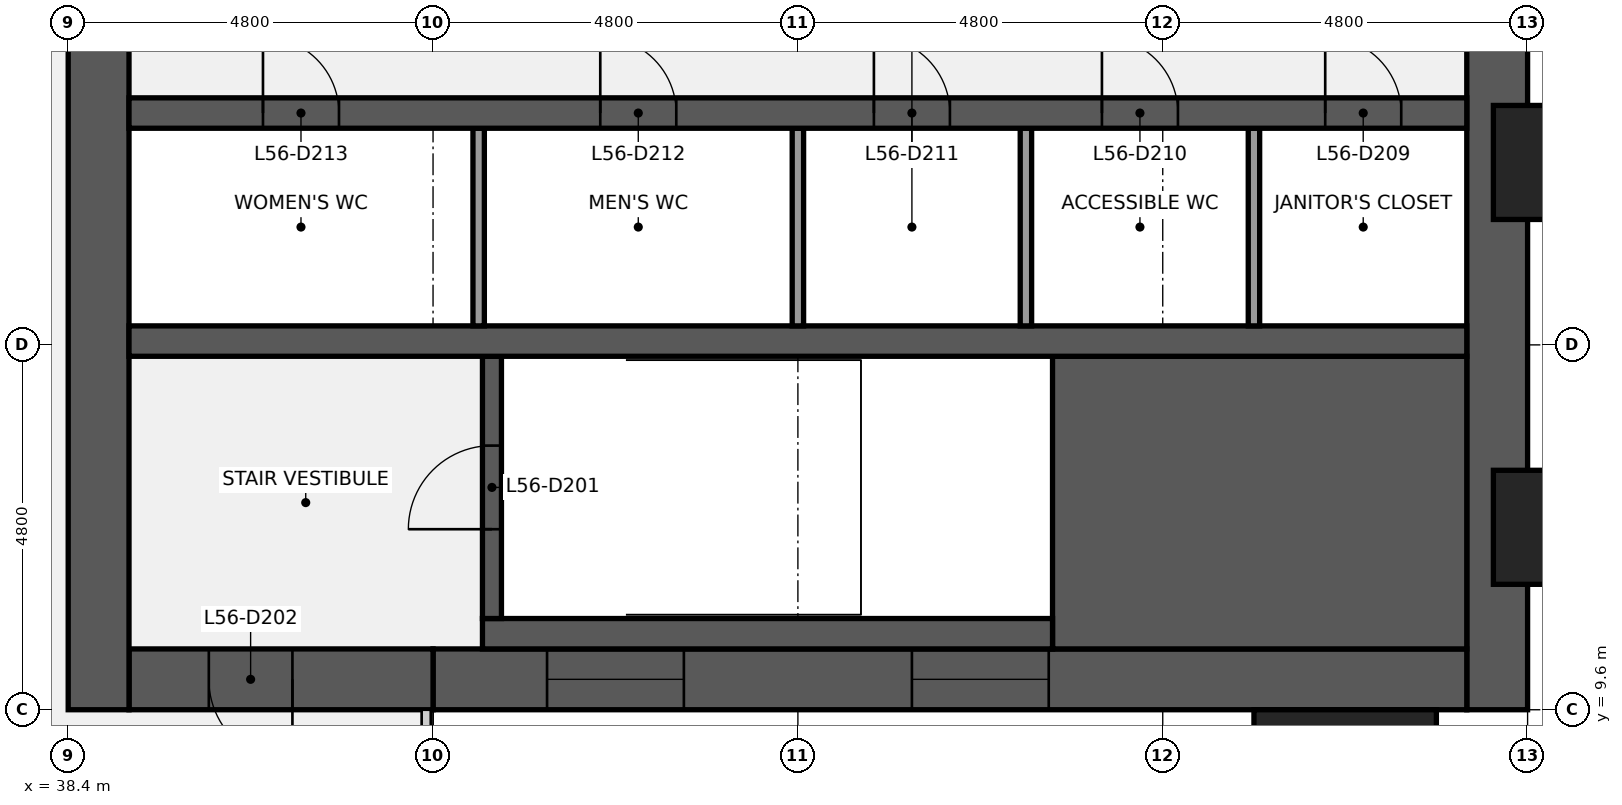
"""IFC4 building model, lengths in metres.
Left out: names, types, materials, properties, quantities, classifications, styles, units other than length and angle.
Written with IfcOpenShell. Run it as: python <this file> out.ifc"""

import sys

from ifc_helpers import new_model, si_unit, direction, frame, frame_2d, origin, origin_2d, place, context, subcontext, project, spatial, rectangle, extrude, element, fill, save


model = new_model("IFC4")
c1 = context("Model", 3, precision=1e-05, world=origin(), true_north=direction((0.0, 1.0)))
c2 = subcontext(c1, "Body", "Model", "MODEL_VIEW")
j1 = project(units=[si_unit("LENGTHUNIT", "METRE"), si_unit("PLANEANGLEUNIT", "RADIAN")], contexts=[c1])
p1 = place(None, origin())
s1 = spatial("IfcSite", under=j1, at=p1, CompositionType="ELEMENT")
p2 = place(p1, origin())
s2 = spatial("IfcBuilding", under=s1, at=p2, CompositionType="ELEMENT")
p3 = place(p2, frame((0.0, 0.0, 253.2)))
s3 = spatial("IfcBuildingStorey", under=s2, at=p3, CompositionType="ELEMENT", Elevation=253.2)
p4 = place(p3, frame((57.2, 38.4, 0.0), z_axis=(0.0, 0.0, 1.0), x_axis=(0.0, -1.0, 0.0)))
e1 = element("IfcWall", 1, at=p4, inside=s3, PredefinedType="SHEAR", context=c2, shape_type="SweptSolid", body=[
    extrude(rectangle(XDim=28.8, YDim=0.8, at=frame_2d((14.4, 0.0))), origin(), (0.0, 0.0, 1.0), 3.84),
])
p5 = place(p4, frame((18.45, 0.0, 0.9)))
e2 = element("IfcOpeningElement", 2, at=p5, cuts=e1, PredefinedType="OPENING", context=c2, shape_type="SweptSolid", body=[
    extrude(rectangle(XDim=1.5, YDim=1.5, at=frame_2d((0.75, 0.75))), frame((0.0, 0.41, 0.0), z_axis=(0.0, -1.0, 0.0), x_axis=(1.0, 0.0, 0.0)), (0.0, 0.0, 1.0), 0.82),
])
p6 = place(p4, frame((8.85, 0.0, 0.9)))
e3 = element("IfcOpeningElement", 3, at=p6, cuts=e1, PredefinedType="OPENING", context=c2, shape_type="SweptSolid", body=[
    extrude(rectangle(XDim=1.5, YDim=1.5, at=frame_2d((0.75, 0.75))), frame((0.0, 0.41, 0.0), z_axis=(0.0, -1.0, 0.0), x_axis=(1.0, 0.0, 0.0)), (0.0, 0.0, 1.0), 0.82),
])
p7 = place(p3, frame((56.8, 10.0, 0.0), z_axis=(0.0, 0.0, 1.0), x_axis=(-1.0, 0.0, 0.0)))
e4 = element("IfcWall", 4, at=p7, inside=s3, PredefinedType="SHEAR", context=c2, shape_type="SweptSolid", body=[
    extrude(rectangle(XDim=13.6, YDim=0.8, at=frame_2d((6.8, 0.0))), origin(), (0.0, 0.0, 1.0), 3.84),
])
p8 = place(p7, frame((5.5, 0.0, 0.9)))
e5 = element("IfcOpeningElement", 5, at=p8, cuts=e4, PredefinedType="OPENING", context=c2, shape_type="SweptSolid", body=[
    extrude(rectangle(XDim=1.8, YDim=1.5, at=frame_2d((0.9, 0.75))), frame((0.0, 0.41, 0.0), z_axis=(0.0, -1.0, 0.0), x_axis=(1.0, 0.0, 0.0)), (0.0, 0.0, 1.0), 0.82),
])
p9 = place(p7, frame((10.3, 0.0, 0.9)))
e6 = element("IfcOpeningElement", 6, at=p9, cuts=e4, PredefinedType="OPENING", context=c2, shape_type="SweptSolid", body=[
    extrude(rectangle(XDim=1.8, YDim=1.5, at=frame_2d((0.9, 0.75))), frame((0.0, 0.41, 0.0), z_axis=(0.0, -1.0, 0.0), x_axis=(1.0, 0.0, 0.0)), (0.0, 0.0, 1.0), 0.82),
])
p10 = place(p3, frame((43.2, 10.0, 0.0), z_axis=(0.0, 0.0, 1.0), x_axis=(-1.0, 0.0, 0.0)))
e7 = element("IfcWall", 7, at=p10, inside=s3, PredefinedType="SHEAR", context=c2, shape_type="SweptSolid", body=[
    extrude(rectangle(XDim=4.0, YDim=0.8, at=frame_2d((2.0, 0.0))), origin(), (0.0, 0.0, 1.0), 3.84),
])
p11 = place(p10, frame((1.85, 0.0, 0.0)))
e8 = element("IfcOpeningElement", 8, at=p11, cuts=e7, PredefinedType="OPENING", context=c2, shape_type="SweptSolid", body=[
    extrude(rectangle(XDim=1.1, YDim=2.1, at=frame_2d((0.55, 1.05))), frame((0.0, 0.41, 0.0), z_axis=(0.0, -1.0, 0.0), x_axis=(1.0, 0.0, 0.0)), (0.0, 0.0, 1.0), 0.82),
])
p12 = place(p3, frame((38.8, 9.6, 0.0), z_axis=(0.0, 0.0, 1.0), x_axis=(0.0, 1.0, 0.0)))
e9 = element("IfcWall", 9, at=p12, inside=s3, PredefinedType="SHEAR", context=c2, shape_type="SweptSolid", body=[
    extrude(rectangle(XDim=28.8, YDim=0.8, at=frame_2d((14.4, 0.0))), origin(), (0.0, 0.0, 1.0), 3.84),
])
p13 = place(p12, frame((8.7, 0.0, 0.0)))
e10 = element("IfcOpeningElement", 10, at=p13, cuts=e9, PredefinedType="OPENING", context=c2, shape_type="SweptSolid", body=[
    extrude(rectangle(XDim=1.8, YDim=2.1, at=frame_2d((0.9, 1.05))), frame((0.0, 0.41, 0.0), z_axis=(0.0, -1.0, 0.0), x_axis=(1.0, 0.0, 0.0)), (0.0, 0.0, 1.0), 0.82),
])
p14 = place(p12, frame((18.3, 0.0, 0.0)))
e11 = element("IfcOpeningElement", 11, at=p14, cuts=e9, PredefinedType="OPENING", context=c2, shape_type="SweptSolid", body=[
    extrude(rectangle(XDim=1.8, YDim=2.1, at=frame_2d((0.9, 1.05))), frame((0.0, 0.41, 0.0), z_axis=(0.0, -1.0, 0.0), x_axis=(1.0, 0.0, 0.0)), (0.0, 0.0, 1.0), 0.82),
])
p15 = place(p3, frame((51.35, 12.325, 0.0), z_axis=(0.0, 0.0, 1.0), x_axis=(1.0, 0.0, 0.0)))
e12 = element("IfcWall", 12, at=p15, inside=s3, PredefinedType="SHEAR", context=c2, shape_type="SweptSolid", body=[
    extrude(rectangle(XDim=5.45, YDim=3.85, at=frame_2d((2.725, 0.0))), origin(), (0.0, 0.0, 1.0), 3.84),
])
p16 = place(p3, frame((43.85, 10.6, 0.0), z_axis=(0.0, 0.0, 1.0), x_axis=(1.0, 0.0, 0.0)))
e13 = element("IfcWall", 13, at=p16, inside=s3, PredefinedType="SHEAR", context=c2, shape_type="SweptSolid", body=[
    extrude(rectangle(XDim=7.5, YDim=0.4, at=frame_2d((3.75, 0.0))), origin(), (0.0, 0.0, 1.0), 3.84),
])
p17 = place(p3, frame((43.975, 10.8, 0.0), z_axis=(0.0, 0.0, 1.0), x_axis=(0.0, 1.0, 0.0)))
e14 = element("IfcWall", 14, at=p17, inside=s3, PredefinedType="SHEAR", context=c2, shape_type="SweptSolid", body=[
    extrude(rectangle(XDim=3.45, YDim=0.25, at=frame_2d((1.725, 0.0))), origin(), (0.0, 0.0, 1.0), 3.84),
])
p18 = place(p17, frame((1.175, 0.0, 0.0)))
e15 = element("IfcOpeningElement", 15, at=p18, cuts=e14, PredefinedType="OPENING", context=c2, shape_type="SweptSolid", body=[
    extrude(rectangle(XDim=1.1, YDim=2.1, at=frame_2d((0.55, 1.05))), frame((0.0, 0.135, 0.0), z_axis=(0.0, -1.0, 0.0), x_axis=(1.0, 0.0, 0.0)), (0.0, 0.0, 1.0), 0.27),
])
p19 = place(p3, frame((39.2, 14.45, 0.0), z_axis=(0.0, 0.0, 1.0), x_axis=(1.0, 0.0, 0.0)))
e16 = element("IfcWall", 16, at=p19, inside=s3, PredefinedType="SHEAR", context=c2, shape_type="SweptSolid", body=[
    extrude(rectangle(XDim=17.6, YDim=0.4, at=frame_2d((8.8, 0.0))), origin(), (0.0, 0.0, 1.0), 3.84),
])
for number, where, z_axis, x_axis in (
    (17, (54.0, 14.65, 0.0), (0.0, 0.0, 1.0), (0.0, 1.0, 0.0)),
    (18, (51.0, 14.65, 0.0), (0.0, 0.0, 1.0), (0.0, 1.0, 0.0)),
    (19, (48.0, 14.65, 0.0), (0.0, 0.0, 1.0), (0.0, 1.0, 0.0)),
    (20, (43.8, 14.65, 0.0), (0.0, 0.0, 1.0), (0.0, 1.0, 0.0)),
):
    element("IfcWall", number, at=place(p3, frame(where, z_axis=z_axis, x_axis=x_axis)), inside=s3, PredefinedType="PARTITIONING", context=c2, shape_type="SweptSolid", body=[
        extrude(rectangle(XDim=2.6, YDim=0.15, at=frame_2d((1.3, 0.0))), origin(), (0.0, 0.0, 1.0), 3.84),
    ])
p20 = place(p3, frame((39.2, 17.45, 0.0), z_axis=(0.0, 0.0, 1.0), x_axis=(1.0, 0.0, 0.0)))
e21 = element("IfcWall", 21, at=p20, inside=s3, PredefinedType="SHEAR", context=c2, shape_type="SweptSolid", body=[
    extrude(rectangle(XDim=17.6, YDim=0.4, at=frame_2d((8.8, 0.0))), origin(), (0.0, 0.0, 1.0), 3.84),
])
p21 = place(p20, frame((15.738, 0.0, 0.0)))
e22 = element("IfcOpeningElement", 22, at=p21, cuts=e21, PredefinedType="OPENING", context=c2, shape_type="SweptSolid", body=[
    extrude(rectangle(XDim=1.0, YDim=2.1, at=frame_2d((0.5, 1.05))), frame((0.0, 0.21, 0.0), z_axis=(0.0, -1.0, 0.0), x_axis=(1.0, 0.0, 0.0)), (0.0, 0.0, 1.0), 0.42),
])
p22 = place(p20, frame((12.8, 0.0, 0.0)))
e23 = element("IfcOpeningElement", 23, at=p22, cuts=e21, PredefinedType="OPENING", context=c2, shape_type="SweptSolid", body=[
    extrude(rectangle(XDim=1.0, YDim=2.1, at=frame_2d((0.5, 1.05))), frame((0.0, 0.21, 0.0), z_axis=(0.0, -1.0, 0.0), x_axis=(1.0, 0.0, 0.0)), (0.0, 0.0, 1.0), 0.42),
])
p23 = place(p20, frame((9.8, 0.0, 0.0)))
e24 = element("IfcOpeningElement", 24, at=p23, cuts=e21, PredefinedType="OPENING", context=c2, shape_type="SweptSolid", body=[
    extrude(rectangle(XDim=1.0, YDim=2.1, at=frame_2d((0.5, 1.05))), frame((0.0, 0.21, 0.0), z_axis=(0.0, -1.0, 0.0), x_axis=(1.0, 0.0, 0.0)), (0.0, 0.0, 1.0), 0.42),
])
p24 = place(p20, frame((6.2, 0.0, 0.0)))
e25 = element("IfcOpeningElement", 25, at=p24, cuts=e21, PredefinedType="OPENING", context=c2, shape_type="SweptSolid", body=[
    extrude(rectangle(XDim=1.0, YDim=2.1, at=frame_2d((0.5, 1.05))), frame((0.0, 0.21, 0.0), z_axis=(0.0, -1.0, 0.0), x_axis=(1.0, 0.0, 0.0)), (0.0, 0.0, 1.0), 0.42),
])
p25 = place(p20, frame((1.762, 0.0, 0.0)))
e26 = element("IfcOpeningElement", 26, at=p25, cuts=e21, PredefinedType="OPENING", context=c2, shape_type="SweptSolid", body=[
    extrude(rectangle(XDim=1.0, YDim=2.1, at=frame_2d((0.5, 1.05))), frame((0.0, 0.21, 0.0), z_axis=(0.0, -1.0, 0.0), x_axis=(1.0, 0.0, 0.0)), (0.0, 0.0, 1.0), 0.42),
])
for number, where, z_axis, x_axis in (
    (27, (55.2, 8.85, 0.0), (0.0, 0.0, 1.0), (1.0, 0.0, 0.0)),
    (28, (58.35, 12.0, 0.0), (0.0, 0.0, 1.0), (0.0, 1.0, 0.0)),
    (29, (58.35, 16.8, 0.0), (0.0, 0.0, 1.0), (0.0, 1.0, 0.0)),
):
    element("IfcColumn", number, at=place(p3, frame(where, z_axis=z_axis, x_axis=x_axis)), inside=s3, PredefinedType="PILASTER", context=c2, shape_type="SweptSolid", body=[
        extrude(rectangle(XDim=2.4, YDim=1.5, at=origin_2d()), origin(), (0.0, 0.0, 1.0), 4.0),
    ])
p26 = place(p18, origin())
e30 = element("IfcDoor", 30, at=p26, inside=s3, OperationType="SINGLE_SWING_LEFT", PredefinedType="DOOR", context=c2, shape_type="SweptSolid", body=[
    extrude(rectangle(XDim=1.1, YDim=2.1, at=frame_2d((0.55, 1.05))), frame((0.0, 0.025, 0.0), z_axis=(0.0, -1.0, 0.0), x_axis=(1.0, 0.0, 0.0)), (0.0, 0.0, 1.0), 0.05),
])
fill(e15, e30)
p27 = place(p11, origin())
e31 = element("IfcDoor", 31, at=p27, inside=s3, OperationType="SINGLE_SWING_LEFT", PredefinedType="DOOR", context=c2, shape_type="SweptSolid", body=[
    extrude(rectangle(XDim=1.1, YDim=2.1, at=frame_2d((0.55, 1.05))), frame((0.0, 0.025, 0.0), z_axis=(0.0, -1.0, 0.0), x_axis=(1.0, 0.0, 0.0)), (0.0, 0.0, 1.0), 0.05),
])
fill(e8, e31)
p28 = place(p21, origin())
e32 = element("IfcDoor", 32, at=p28, inside=s3, OperationType="SINGLE_SWING_LEFT", PredefinedType="DOOR", context=c2, shape_type="SweptSolid", body=[
    extrude(rectangle(XDim=1.0, YDim=2.1, at=frame_2d((0.5, 1.05))), frame((0.0, 0.025, 0.0), z_axis=(0.0, -1.0, 0.0), x_axis=(1.0, 0.0, 0.0)), (0.0, 0.0, 1.0), 0.05),
])
fill(e22, e32)
p29 = place(p22, origin())
e33 = element("IfcDoor", 33, at=p29, inside=s3, OperationType="SINGLE_SWING_LEFT", PredefinedType="DOOR", context=c2, shape_type="SweptSolid", body=[
    extrude(rectangle(XDim=1.0, YDim=2.1, at=frame_2d((0.5, 1.05))), frame((0.0, 0.025, 0.0), z_axis=(0.0, -1.0, 0.0), x_axis=(1.0, 0.0, 0.0)), (0.0, 0.0, 1.0), 0.05),
])
fill(e23, e33)
p30 = place(p23, origin())
e34 = element("IfcDoor", 34, at=p30, inside=s3, OperationType="SINGLE_SWING_LEFT", PredefinedType="DOOR", context=c2, shape_type="SweptSolid", body=[
    extrude(rectangle(XDim=1.0, YDim=2.1, at=frame_2d((0.5, 1.05))), frame((0.0, 0.025, 0.0), z_axis=(0.0, -1.0, 0.0), x_axis=(1.0, 0.0, 0.0)), (0.0, 0.0, 1.0), 0.05),
])
fill(e24, e34)
p31 = place(p24, origin())
e35 = element("IfcDoor", 35, at=p31, inside=s3, OperationType="SINGLE_SWING_LEFT", PredefinedType="DOOR", context=c2, shape_type="SweptSolid", body=[
    extrude(rectangle(XDim=1.0, YDim=2.1, at=frame_2d((0.5, 1.05))), frame((0.0, 0.025, 0.0), z_axis=(0.0, -1.0, 0.0), x_axis=(1.0, 0.0, 0.0)), (0.0, 0.0, 1.0), 0.05),
])
fill(e25, e35)
p32 = place(p25, origin())
e36 = element("IfcDoor", 36, at=p32, inside=s3, OperationType="SINGLE_SWING_LEFT", PredefinedType="DOOR", context=c2, shape_type="SweptSolid", body=[
    extrude(rectangle(XDim=1.0, YDim=2.1, at=frame_2d((0.5, 1.05))), frame((0.0, 0.025, 0.0), z_axis=(0.0, -1.0, 0.0), x_axis=(1.0, 0.0, 0.0)), (0.0, 0.0, 1.0), 0.05),
])
fill(e26, e36)
p33 = place(p8, origin())
e37 = element("IfcWindow", 37, at=p33, inside=s3, PartitioningType="SINGLE_PANEL", PredefinedType="WINDOW", context=c2, shape_type="SweptSolid", body=[
    extrude(rectangle(XDim=1.8, YDim=1.5, at=frame_2d((0.9, 0.75))), frame((0.0, 0.03, 0.0), z_axis=(0.0, -1.0, 0.0), x_axis=(1.0, 0.0, 0.0)), (0.0, 0.0, 1.0), 0.06),
])
fill(e5, e37)
p34 = place(p9, origin())
e38 = element("IfcWindow", 38, at=p34, inside=s3, PartitioningType="SINGLE_PANEL", PredefinedType="WINDOW", context=c2, shape_type="SweptSolid", body=[
    extrude(rectangle(XDim=1.8, YDim=1.5, at=frame_2d((0.9, 0.75))), frame((0.0, 0.03, 0.0), z_axis=(0.0, -1.0, 0.0), x_axis=(1.0, 0.0, 0.0)), (0.0, 0.0, 1.0), 0.06),
])
fill(e6, e38)
save(model, sys.argv[1])
